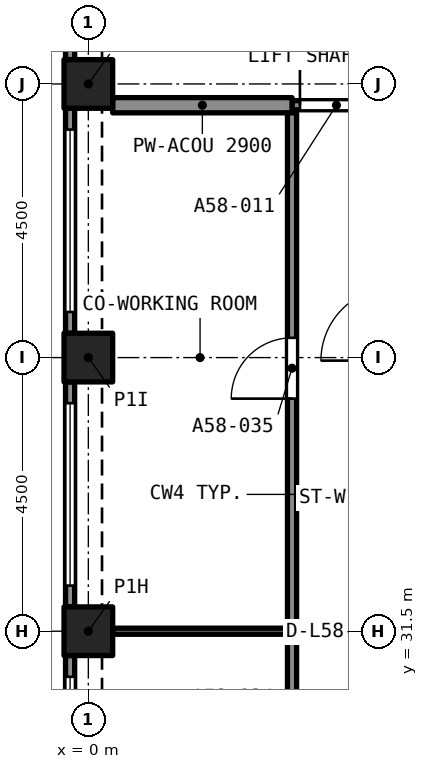
"""IFC4 building model, lengths in metres.
Left out: names, types, materials, properties, quantities, classifications, styles, units other than length and angle.
Written with IfcOpenShell. Run it as: python <this file> out.ifc"""

import sys

from ifc_helpers import new_model, si_unit, direction, frame, frame_2d, origin, origin_2d, place, context, subcontext, project, spatial, rectangle, extrude, element, fill, save


model = new_model("IFC4")
c1 = context("Model", 3, precision=1e-05, world=origin(), true_north=direction((0.0, 1.0)))
c2 = subcontext(c1, "Body", "Model", "MODEL_VIEW")
j1 = project(units=[si_unit("LENGTHUNIT", "METRE"), si_unit("PLANEANGLEUNIT", "RADIAN")], contexts=[c1])
p1 = place(None, origin())
s1 = spatial("IfcSite", under=j1, at=p1, CompositionType="ELEMENT")
p2 = place(p1, origin())
s2 = spatial("IfcBuilding", under=s1, at=p2, CompositionType="ELEMENT")
p3 = place(p2, frame((0.0, 0.0, 210.095)))
s3 = spatial("IfcBuildingStorey", under=s2, at=p3, CompositionType="ELEMENT", Elevation=210.095)
for number, where, z_axis, x_axis in (
    (1, (0.0, 31.5, 0.0), (0.0, 0.0, 1.0), (1.0, 0.0, 0.0)),
    (2, (0.0, 36.0, 0.0), (0.0, 0.0, 1.0), (1.0, 0.0, 0.0)),
    (3, (0.0, 40.5, 0.0), (0.0, 0.0, 1.0), (1.0, 0.0, 0.0)),
):
    element("IfcColumn", number, at=place(p3, frame(where, z_axis=z_axis, x_axis=x_axis)), inside=s3, PredefinedType="COLUMN", context=c2, shape_type="SweptSolid", body=[
        extrude(rectangle(XDim=0.8, YDim=0.8, at=origin_2d()), origin(), (0.0, 0.0, 1.0), 3.2),
    ])
p4 = place(p3, frame((-0.3, 40.9, 0.0), z_axis=(0.0, 0.0, 1.0), x_axis=(0.0, 1.0, 0.0)))
e4 = element("IfcWall", 4, at=p4, inside=s3, PredefinedType="SOLIDWALL", context=c2, shape_type="SweptSolid", body=[
    extrude(rectangle(XDim=3.7, YDim=0.15, at=frame_2d((1.85, 0.0))), origin(), (0.0, 0.0, 1.0), 3.2),
])
p5 = place(p4, frame((0.35, 0.0, 0.45)))
e5 = element("IfcOpeningElement", 5, at=p5, cuts=e4, PredefinedType="OPENING", context=c2, shape_type="SweptSolid", body=[
    extrude(rectangle(XDim=3.0, YDim=1.95, at=frame_2d((1.5, 0.975))), frame((0.0, 0.085, 0.0), z_axis=(0.0, -1.0, 0.0), x_axis=(1.0, 0.0, 0.0)), (0.0, 0.0, 1.0), 0.17),
])
p6 = place(p3, frame((-0.3, 36.4, 0.0), z_axis=(0.0, 0.0, 1.0), x_axis=(0.0, 1.0, 0.0)))
e6 = element("IfcWall", 6, at=p6, inside=s3, PredefinedType="SOLIDWALL", context=c2, shape_type="SweptSolid", body=[
    extrude(rectangle(XDim=3.7, YDim=0.15, at=frame_2d((1.85, 0.0))), origin(), (0.0, 0.0, 1.0), 3.2),
])
p7 = place(p6, frame((0.35, 0.0, 0.45)))
e7 = element("IfcOpeningElement", 7, at=p7, cuts=e6, PredefinedType="OPENING", context=c2, shape_type="SweptSolid", body=[
    extrude(rectangle(XDim=3.0, YDim=1.95, at=frame_2d((1.5, 0.975))), frame((0.0, 0.085, 0.0), z_axis=(0.0, -1.0, 0.0), x_axis=(1.0, 0.0, 0.0)), (0.0, 0.0, 1.0), 0.17),
])
p8 = place(p3, frame((-0.3, 31.9, 0.0), z_axis=(0.0, 0.0, 1.0), x_axis=(0.0, 1.0, 0.0)))
e8 = element("IfcWall", 8, at=p8, inside=s3, PredefinedType="SOLIDWALL", context=c2, shape_type="SweptSolid", body=[
    extrude(rectangle(XDim=3.7, YDim=0.15, at=frame_2d((1.85, 0.0))), origin(), (0.0, 0.0, 1.0), 3.2),
])
p9 = place(p8, frame((0.35, 0.0, 0.45)))
e9 = element("IfcOpeningElement", 9, at=p9, cuts=e8, PredefinedType="OPENING", context=c2, shape_type="SweptSolid", body=[
    extrude(rectangle(XDim=3.0, YDim=1.95, at=frame_2d((1.5, 0.975))), frame((0.0, 0.085, 0.0), z_axis=(0.0, -1.0, 0.0), x_axis=(1.0, 0.0, 0.0)), (0.0, 0.0, 1.0), 0.17),
])
p10 = place(p3, frame((-0.3, 27.4, 0.0), z_axis=(0.0, 0.0, 1.0), x_axis=(0.0, 1.0, 0.0)))
e10 = element("IfcWall", 10, at=p10, inside=s3, PredefinedType="SOLIDWALL", context=c2, shape_type="SweptSolid", body=[
    extrude(rectangle(XDim=3.7, YDim=0.15, at=frame_2d((1.85, 0.0))), origin(), (0.0, 0.0, 1.0), 3.2),
])
p11 = place(p10, frame((0.35, 0.0, 0.45)))
e11 = element("IfcOpeningElement", 11, at=p11, cuts=e10, PredefinedType="OPENING", context=c2, shape_type="SweptSolid", body=[
    extrude(rectangle(XDim=3.0, YDim=1.95, at=frame_2d((1.5, 0.975))), frame((0.0, 0.085, 0.0), z_axis=(0.0, -1.0, 0.0), x_axis=(1.0, 0.0, 0.0)), (0.0, 0.0, 1.0), 0.17),
])
p12 = place(p3, frame((3.35, 40.15, 0.0), z_axis=(0.0, 0.0, 1.0), x_axis=(1.0, 0.0, 0.0)))
e12 = element("IfcWall", 12, at=p12, inside=s3, PredefinedType="PARTITIONING", context=c2, shape_type="SweptSolid", body=[
    extrude(rectangle(XDim=1.5, YDim=0.15, at=frame_2d((0.75, 0.0))), origin(), (0.0, 0.0, 1.0), 2.9),
])
p13 = place(p12, frame((0.13, 0.0, 0.0)))
e13 = element("IfcOpeningElement", 13, at=p13, cuts=e12, PredefinedType="OPENING", context=c2, shape_type="SweptSolid", body=[
    extrude(rectangle(XDim=1.2, YDim=2.4, at=frame_2d((0.6, 1.2))), frame((0.0, 0.085, 0.0), z_axis=(0.0, -1.0, 0.0), x_axis=(1.0, 0.0, 0.0)), (0.0, 0.0, 1.0), 0.17),
])
p14 = place(p3, frame((0.4, 40.15, 0.0), z_axis=(0.0, 0.0, 1.0), x_axis=(1.0, 0.0, 0.0)))
e14 = element("IfcWall", 14, at=p14, inside=s3, PredefinedType="PARTITIONING", context=c2, shape_type="SweptSolid", body=[
    extrude(rectangle(XDim=2.95, YDim=0.25, at=frame_2d((1.475, 0.0))), origin(), (0.0, 0.0, 1.0), 2.9),
])
p15 = place(p3, frame((3.35, 27.35, 0.0), z_axis=(0.0, 0.0, 1.0), x_axis=(0.0, 1.0, 0.0)))
e15 = element("IfcWall", 15, at=p15, inside=s3, PredefinedType="PARTITIONING", context=c2, shape_type="SweptSolid", body=[
    extrude(rectangle(XDim=4.15, YDim=0.15, at=frame_2d((2.075, 0.0))), origin(), (0.0, 0.0, 1.0), 2.9),
])
p16 = place(p15, frame((1.575, 0.0, 0.0)))
e16 = element("IfcOpeningElement", 16, at=p16, cuts=e15, PredefinedType="OPENING", context=c2, shape_type="SweptSolid", body=[
    extrude(rectangle(XDim=1.0, YDim=2.1, at=frame_2d((0.5, 1.05))), frame((0.0, 0.085, 0.0), z_axis=(0.0, -1.0, 0.0), x_axis=(1.0, 0.0, 0.0)), (0.0, 0.0, 1.0), 0.17),
])
p17 = place(p3, frame((3.35, 31.5, 0.0), z_axis=(0.0, 0.0, 1.0), x_axis=(0.0, 1.0, 0.0)))
e17 = element("IfcWall", 17, at=p17, inside=s3, PredefinedType="PARTITIONING", context=c2, shape_type="SweptSolid", body=[
    extrude(rectangle(XDim=8.525, YDim=0.15, at=frame_2d((4.262, 0.0))), origin(), (0.0, 0.0, 1.0), 2.9),
])
p18 = place(p17, frame((3.825, 0.0, 0.0)))
e18 = element("IfcOpeningElement", 18, at=p18, cuts=e17, PredefinedType="OPENING", context=c2, shape_type="SweptSolid", body=[
    extrude(rectangle(XDim=1.0, YDim=2.1, at=frame_2d((0.5, 1.05))), frame((0.0, 0.085, 0.0), z_axis=(0.0, -1.0, 0.0), x_axis=(1.0, 0.0, 0.0)), (0.0, 0.0, 1.0), 0.17),
])
p19 = place(p3, frame((0.4, 31.5, 0.0), z_axis=(0.0, 0.0, 1.0), x_axis=(1.0, 0.0, 0.0)))
e19 = element("IfcWall", 19, at=p19, inside=s3, PredefinedType="PARTITIONING", context=c2, shape_type="SweptSolid", body=[
    extrude(rectangle(XDim=2.875, YDim=0.1, at=frame_2d((1.438, 0.0))), origin(), (0.0, 0.0, 1.0), 2.9),
])
p20 = place(p7, origin())
e20 = element("IfcWindow", 20, at=p20, inside=s3, PartitioningType="SINGLE_PANEL", PredefinedType="WINDOW", context=c2, shape_type="SweptSolid", body=[
    extrude(rectangle(XDim=3.0, YDim=1.95, at=frame_2d((1.5, 0.975))), frame((0.0, 0.03, 0.0), z_axis=(0.0, -1.0, 0.0), x_axis=(1.0, 0.0, 0.0)), (0.0, 0.0, 1.0), 0.06),
])
fill(e7, e20)
p21 = place(p9, origin())
e21 = element("IfcWindow", 21, at=p21, inside=s3, PartitioningType="SINGLE_PANEL", PredefinedType="WINDOW", context=c2, shape_type="SweptSolid", body=[
    extrude(rectangle(XDim=3.0, YDim=1.95, at=frame_2d((1.5, 0.975))), frame((0.0, 0.03, 0.0), z_axis=(0.0, -1.0, 0.0), x_axis=(1.0, 0.0, 0.0)), (0.0, 0.0, 1.0), 0.06),
])
fill(e9, e21)
p22 = place(p11, origin())
e22 = element("IfcWindow", 22, at=p22, inside=s3, PartitioningType="SINGLE_PANEL", PredefinedType="WINDOW", context=c2, shape_type="SweptSolid", body=[
    extrude(rectangle(XDim=3.0, YDim=1.95, at=frame_2d((1.5, 0.975))), frame((0.0, 0.03, 0.0), z_axis=(0.0, -1.0, 0.0), x_axis=(1.0, 0.0, 0.0)), (0.0, 0.0, 1.0), 0.06),
])
fill(e11, e22)
p23 = place(p13, origin())
e23 = element("IfcDoor", 23, at=p23, inside=s3, OperationType="SINGLE_SWING_LEFT", PredefinedType="DOOR", context=c2, shape_type="SweptSolid", body=[
    extrude(rectangle(XDim=1.2, YDim=2.4, at=frame_2d((0.6, 1.2))), frame((0.0, 0.025, 0.0), z_axis=(0.0, -1.0, 0.0), x_axis=(1.0, 0.0, 0.0)), (0.0, 0.0, 1.0), 0.05),
])
fill(e13, e23)
p24 = place(p18, origin())
e24 = element("IfcDoor", 24, at=p24, inside=s3, OperationType="SINGLE_SWING_RIGHT", PredefinedType="DOOR", context=c2, shape_type="SweptSolid", body=[
    extrude(rectangle(XDim=1.0, YDim=2.1, at=frame_2d((0.5, 1.05))), frame((0.0, 0.025, 0.0), z_axis=(0.0, -1.0, 0.0), x_axis=(1.0, 0.0, 0.0)), (0.0, 0.0, 1.0), 0.05),
])
fill(e18, e24)
save(model, sys.argv[1])
